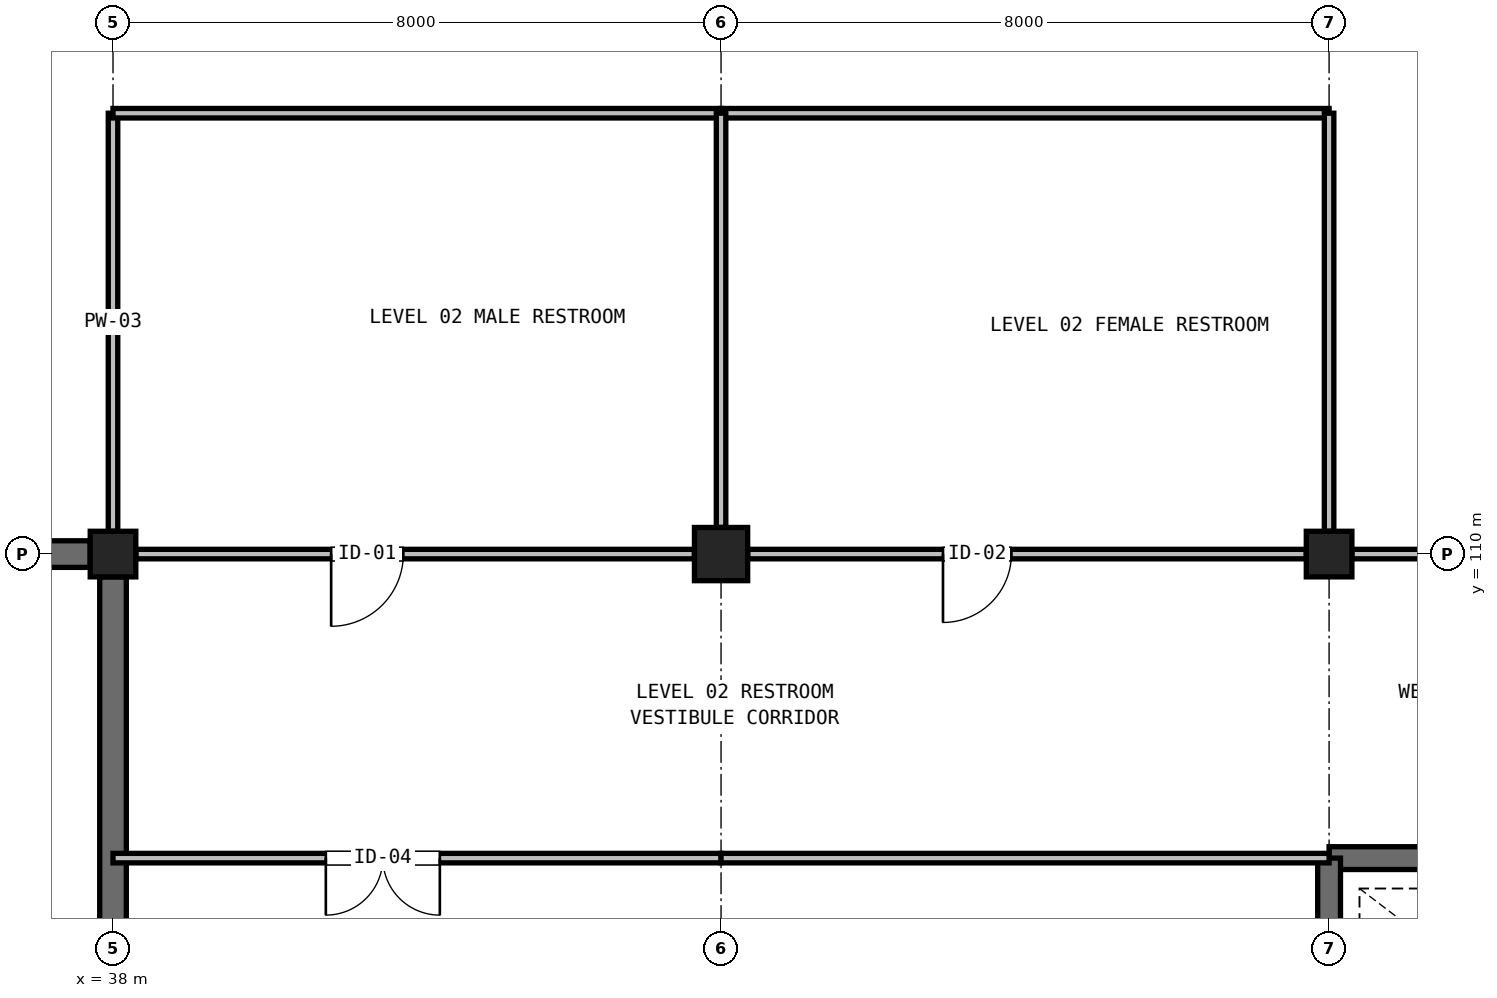
"""IFC4 building model, lengths in metres.
Left out: names, types, materials, properties, quantities, classifications, styles, units other than length and angle.
Written with IfcOpenShell. Run it as: python <this file> out.ifc"""

import sys

from ifc_helpers import new_model, si_unit, direction, frame, frame_2d, origin, origin_2d, place, context, subcontext, project, spatial, rectangle, extrude, element, fill, save


model = new_model("IFC4")
c1 = context("Model", 3, precision=1e-05, world=origin(), true_north=direction((0.0, 1.0)))
c2 = subcontext(c1, "Body", "Model", "MODEL_VIEW")
j1 = project(units=[si_unit("LENGTHUNIT", "METRE"), si_unit("PLANEANGLEUNIT", "RADIAN")], contexts=[c1])
p1 = place(None, origin())
s1 = spatial("IfcSite", under=j1, at=p1, CompositionType="ELEMENT")
p2 = place(p1, origin())
s2 = spatial("IfcBuilding", under=s1, at=p2, CompositionType="ELEMENT")
p3 = place(p2, frame((0.0, 0.0, 10.8)))
s3 = spatial("IfcBuildingStorey", under=s2, at=p3, CompositionType="ELEMENT", Elevation=10.8)
p4 = place(p3, frame((38.0, 110.0, 0.0), z_axis=(0.0, 0.0, 1.0), x_axis=(1.0, 0.0, 0.0)))
e1 = element("IfcColumn", 1, at=p4, inside=s3, PredefinedType="COLUMN", context=c2, shape_type="SweptSolid", body=[
    extrude(rectangle(XDim=0.6, YDim=0.6, at=origin_2d()), origin(), (0.0, 0.0, 1.0), 4.2),
])
p5 = place(p3, frame((46.0, 110.0, 0.0), z_axis=(0.0, 0.0, 1.0), x_axis=(1.0, 0.0, 0.0)))
e2 = element("IfcColumn", 2, at=p5, inside=s3, PredefinedType="COLUMN", context=c2, shape_type="SweptSolid", body=[
    extrude(rectangle(XDim=0.7, YDim=0.7, at=origin_2d()), origin(), (0.0, 0.0, 1.0), 4.2),
])
p6 = place(p3, frame((54.0, 110.0, 0.0), z_axis=(0.0, 0.0, 1.0), x_axis=(1.0, 0.0, 0.0)))
e3 = element("IfcColumn", 3, at=p6, inside=s3, PredefinedType="COLUMN", context=c2, shape_type="SweptSolid", body=[
    extrude(rectangle(XDim=0.6, YDim=0.6, at=origin_2d()), origin(), (0.0, 0.0, 1.0), 4.2),
])
for number, where, z_axis, x_axis in (
    (4, (30.325, 110.0, 0.0), (0.0, 0.0, 1.0), (1.0, 0.0, 0.0)),
    (5, (38.0, 102.325, 0.0), (0.0, 0.0, 1.0), (0.0, 1.0, 0.0)),
):
    element("IfcWall", number, at=place(p3, frame(where, z_axis=z_axis, x_axis=x_axis)), inside=s3, PredefinedType="SHEAR", context=c2, shape_type="SweptSolid", body=[
        extrude(rectangle(XDim=7.375, YDim=0.35, at=frame_2d((3.688, 0.0))), origin(), (0.0, 0.0, 1.0), 3.98),
    ])
p7 = place(p3, frame((54.0, 106.0, 0.0), z_axis=(0.0, 0.0, 1.0), x_axis=(1.0, 0.0, 0.0)))
e6 = element("IfcWall", 6, at=p7, inside=s3, PredefinedType="SHEAR", context=c2, shape_type="SweptSolid", body=[
    extrude(rectangle(XDim=8.0, YDim=0.3, at=frame_2d((4.0, 0.0))), origin(), (0.0, 0.0, 1.0), 3.98),
])
p8 = place(p3, frame((54.0, 102.325, 0.0), z_axis=(0.0, 0.0, 1.0), x_axis=(0.0, 1.0, 0.0)))
e7 = element("IfcWall", 7, at=p8, inside=s3, PredefinedType="SHEAR", context=c2, shape_type="SweptSolid", body=[
    extrude(rectangle(XDim=3.675, YDim=0.3, at=frame_2d((1.837, 0.0))), origin(), (0.0, 0.0, 1.0), 3.98),
])
p9 = place(p3, frame((38.0, 110.3, 0.0), z_axis=(0.0, 0.0, 1.0), x_axis=(0.0, 1.0, 0.0)))
e8 = element("IfcWall", 8, at=p9, inside=s3, PredefinedType="PARTITIONING", context=c2, shape_type="SweptSolid", body=[
    extrude(rectangle(XDim=5.5, YDim=0.125, at=frame_2d((2.75, 0.0))), origin(), (0.0, 0.0, 1.0), 3.21),
])
p10 = place(p3, frame((38.0, 106.0, 0.0), z_axis=(0.0, 0.0, 1.0), x_axis=(1.0, 0.0, 0.0)))
e9 = element("IfcWall", 9, at=p10, inside=s3, PredefinedType="PARTITIONING", context=c2, shape_type="SweptSolid", body=[
    extrude(rectangle(XDim=8.0, YDim=0.125, at=frame_2d((4.0, 0.0))), origin(), (0.0, 0.0, 1.0), 3.9),
])
p11 = place(p10, frame((2.8, 0.0, 0.0)))
e10 = element("IfcOpeningElement", 10, at=p11, cuts=e9, PredefinedType="OPENING", context=c2, shape_type="SweptSolid", body=[
    extrude(rectangle(XDim=1.5, YDim=2.2, at=frame_2d((0.75, 1.1))), frame((0.0, 0.073, 0.0), z_axis=(0.0, -1.0, 0.0), x_axis=(1.0, 0.0, 0.0)), (0.0, 0.0, 1.0), 0.145),
])
p12 = place(p3, frame((46.0, 106.0, 0.0), z_axis=(0.0, 0.0, 1.0), x_axis=(1.0, 0.0, 0.0)))
e11 = element("IfcWall", 11, at=p12, inside=s3, PredefinedType="PARTITIONING", context=c2, shape_type="SweptSolid", body=[
    extrude(rectangle(XDim=8.0, YDim=0.125, at=frame_2d((4.0, 0.0))), origin(), (0.0, 0.0, 1.0), 3.9),
])
p13 = place(p3, frame((38.3, 110.0, 0.0), z_axis=(0.0, 0.0, 1.0), x_axis=(1.0, 0.0, 0.0)))
e12 = element("IfcWall", 12, at=p13, inside=s3, PredefinedType="PARTITIONING", context=c2, shape_type="SweptSolid", body=[
    extrude(rectangle(XDim=7.35, YDim=0.125, at=frame_2d((3.675, 0.0))), origin(), (0.0, 0.0, 1.0), 2.96),
])
p14 = place(p13, frame((2.57, 0.0, 0.0)))
e13 = element("IfcOpeningElement", 13, at=p14, cuts=e12, PredefinedType="OPENING", context=c2, shape_type="SweptSolid", body=[
    extrude(rectangle(XDim=0.95, YDim=2.1, at=frame_2d((0.475, 1.05))), frame((0.0, 0.073, 0.0), z_axis=(0.0, -1.0, 0.0), x_axis=(1.0, 0.0, 0.0)), (0.0, 0.0, 1.0), 0.145),
])
p15 = place(p3, frame((46.35, 110.0, 0.0), z_axis=(0.0, 0.0, 1.0), x_axis=(1.0, 0.0, 0.0)))
e14 = element("IfcWall", 14, at=p15, inside=s3, PredefinedType="PARTITIONING", context=c2, shape_type="SweptSolid", body=[
    extrude(rectangle(XDim=7.35, YDim=0.125, at=frame_2d((3.675, 0.0))), origin(), (0.0, 0.0, 1.0), 2.86),
])
p16 = place(p15, frame((2.57, 0.0, 0.0)))
e15 = element("IfcOpeningElement", 15, at=p16, cuts=e14, PredefinedType="OPENING", context=c2, shape_type="SweptSolid", body=[
    extrude(rectangle(XDim=0.9, YDim=2.1, at=frame_2d((0.45, 1.05))), frame((0.0, 0.073, 0.0), z_axis=(0.0, -1.0, 0.0), x_axis=(1.0, 0.0, 0.0)), (0.0, 0.0, 1.0), 0.145),
])
p17 = place(p3, frame((54.3, 110.0, 0.0), z_axis=(0.0, 0.0, 1.0), x_axis=(1.0, 0.0, 0.0)))
e16 = element("IfcWall", 16, at=p17, inside=s3, PredefinedType="PARTITIONING", context=c2, shape_type="SweptSolid", body=[
    extrude(rectangle(XDim=11.7, YDim=0.125, at=frame_2d((5.85, 0.0))), origin(), (0.0, 0.0, 1.0), 3.31),
])
for number, where, z_axis, x_axis in (
    (17, (38.0, 115.8, 0.0), (0.0, 0.0, 1.0), (1.0, 0.0, 0.0)),
    (18, (46.0, 115.8, 0.0), (0.0, 0.0, 1.0), (1.0, 0.0, 0.0)),
):
    element("IfcWall", number, at=place(p3, frame(where, z_axis=z_axis, x_axis=x_axis)), inside=s3, PredefinedType="PARTITIONING", context=c2, shape_type="SweptSolid", body=[
        extrude(rectangle(XDim=8.0, YDim=0.125, at=frame_2d((4.0, 0.0))), origin(), (0.0, 0.0, 1.0), 3.9),
    ])
p18 = place(p3, frame((46.0, 110.35, 0.0), z_axis=(0.0, 0.0, 1.0), x_axis=(0.0, 1.0, 0.0)))
e19 = element("IfcWall", 19, at=p18, inside=s3, PredefinedType="PARTITIONING", context=c2, shape_type="SweptSolid", body=[
    extrude(rectangle(XDim=5.45, YDim=0.125, at=frame_2d((2.725, 0.0))), origin(), (0.0, 0.0, 1.0), 3.41),
])
p19 = place(p3, frame((54.0, 110.3, 0.0), z_axis=(0.0, 0.0, 1.0), x_axis=(0.0, 1.0, 0.0)))
e20 = element("IfcWall", 20, at=p19, inside=s3, PredefinedType="PARTITIONING", context=c2, shape_type="SweptSolid", body=[
    extrude(rectangle(XDim=5.5, YDim=0.125, at=frame_2d((2.75, 0.0))), origin(), (0.0, 0.0, 1.0), 3.11),
])
p20 = place(p11, frame((1.5, 0.0, 0.0), z_axis=(0.0, 0.0, 1.0), x_axis=(-1.0, 0.0, 0.0)))
e21 = element("IfcDoor", 21, at=p20, inside=s3, OperationType="DOUBLE_DOOR_SINGLE_SWING", PredefinedType="DOOR", context=c2, shape_type="SweptSolid", body=[
    extrude(rectangle(XDim=1.5, YDim=2.2, at=frame_2d((0.75, 1.1))), frame((0.0, 0.025, 0.0), z_axis=(0.0, -1.0, 0.0), x_axis=(1.0, 0.0, 0.0)), (0.0, 0.0, 1.0), 0.05),
])
fill(e10, e21)
p21 = place(p14, frame((0.95, 0.0, 0.0), z_axis=(0.0, 0.0, 1.0), x_axis=(-1.0, 0.0, 0.0)))
e22 = element("IfcDoor", 22, at=p21, inside=s3, OperationType="SINGLE_SWING_LEFT", PredefinedType="DOOR", context=c2, shape_type="SweptSolid", body=[
    extrude(rectangle(XDim=0.95, YDim=2.1, at=frame_2d((0.475, 1.05))), frame((0.0, 0.025, 0.0), z_axis=(0.0, -1.0, 0.0), x_axis=(1.0, 0.0, 0.0)), (0.0, 0.0, 1.0), 0.05),
])
fill(e13, e22)
p22 = place(p16, frame((0.9, 0.0, 0.0), z_axis=(0.0, 0.0, 1.0), x_axis=(-1.0, 0.0, 0.0)))
e23 = element("IfcDoor", 23, at=p22, inside=s3, OperationType="SINGLE_SWING_LEFT", PredefinedType="DOOR", context=c2, shape_type="SweptSolid", body=[
    extrude(rectangle(XDim=0.9, YDim=2.1, at=frame_2d((0.45, 1.05))), frame((0.0, 0.025, 0.0), z_axis=(0.0, -1.0, 0.0), x_axis=(1.0, 0.0, 0.0)), (0.0, 0.0, 1.0), 0.05),
])
fill(e15, e23)
save(model, sys.argv[1])
